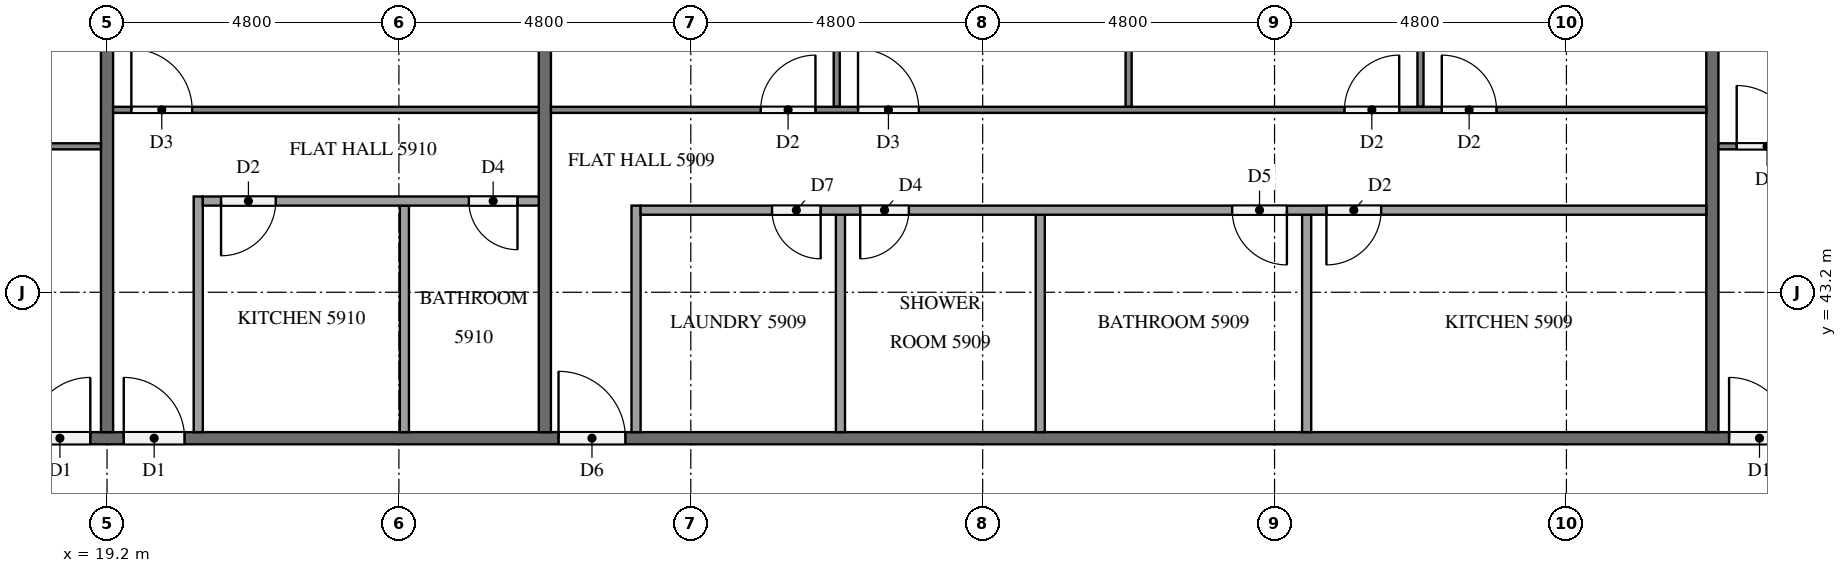
"""IFC4 building model, lengths in metres.
Left out: names, types, materials, properties, quantities, classifications, styles, units other than length and angle.
Written with IfcOpenShell. Run it as: python <this file> out.ifc"""

import sys

from ifc_helpers import new_model, si_unit, direction, frame, frame_2d, origin, place, context, subcontext, project, spatial, rectangle, extrude, element, fill, save


model = new_model("IFC4")
c1 = context("Model", 3, precision=1e-05, world=origin(), true_north=direction((0.0, 1.0)))
c2 = subcontext(c1, "Body", "Model", "MODEL_VIEW")
j1 = project(units=[si_unit("LENGTHUNIT", "METRE"), si_unit("PLANEANGLEUNIT", "RADIAN")], contexts=[c1])
p1 = place(None, origin())
s1 = spatial("IfcSite", under=j1, at=p1, CompositionType="ELEMENT")
p2 = place(p1, origin())
s2 = spatial("IfcBuilding", under=s1, at=p2, CompositionType="ELEMENT")
p3 = place(p2, frame((0.0, 0.0, 226.3)))
s3 = spatial("IfcBuildingStorey", under=s2, at=p3, CompositionType="ELEMENT", Elevation=226.3)
p4 = place(p3, frame((11.9, 40.8, 0.0), z_axis=(0.0, 0.0, 1.0), x_axis=(1.0, 0.0, 0.0)))
e1 = element("IfcWall", 1, at=p4, inside=s3, PredefinedType="PARTITIONING", context=c2, shape_type="SweptSolid", body=[
    extrude(rectangle(XDim=38.6, YDim=0.2, at=frame_2d((19.3, 0.0))), origin(), (0.0, 0.0, 1.0), 3.2),
])
p5 = place(p4, frame((33.975, 0.0, 0.0)))
e2 = element("IfcOpeningElement", 2, at=p5, cuts=e1, PredefinedType="OPENING", context=c2, shape_type="SweptSolid", body=[
    extrude(rectangle(XDim=1.0, YDim=2.1, at=frame_2d((0.5, 1.05))), frame((0.0, 0.11, 0.0), z_axis=(0.0, -1.0, 0.0), x_axis=(1.0, 0.0, 0.0)), (0.0, 0.0, 1.0), 0.22),
])
p6 = place(p4, frame((14.725, 0.0, 0.0)))
e3 = element("IfcOpeningElement", 3, at=p6, cuts=e1, PredefinedType="OPENING", context=c2, shape_type="SweptSolid", body=[
    extrude(rectangle(XDim=1.1, YDim=2.1, at=frame_2d((0.55, 1.05))), frame((0.0, 0.11, 0.0), z_axis=(0.0, -1.0, 0.0), x_axis=(1.0, 0.0, 0.0)), (0.0, 0.0, 1.0), 0.22),
])
p7 = place(p4, frame((7.575, 0.0, 0.0)))
e4 = element("IfcOpeningElement", 4, at=p7, cuts=e1, PredefinedType="OPENING", context=c2, shape_type="SweptSolid", body=[
    extrude(rectangle(XDim=1.0, YDim=2.1, at=frame_2d((0.5, 1.05))), frame((0.0, 0.11, 0.0), z_axis=(0.0, -1.0, 0.0), x_axis=(1.0, 0.0, 0.0)), (0.0, 0.0, 1.0), 0.22),
])
p8 = place(p4, frame((6.025, 0.0, 0.0)))
e5 = element("IfcOpeningElement", 5, at=p8, cuts=e1, PredefinedType="OPENING", context=c2, shape_type="SweptSolid", body=[
    extrude(rectangle(XDim=1.0, YDim=2.1, at=frame_2d((0.5, 1.05))), frame((0.0, 0.11, 0.0), z_axis=(0.0, -1.0, 0.0), x_axis=(1.0, 0.0, 0.0)), (0.0, 0.0, 1.0), 0.22),
])
for number, where, z_axis, x_axis in (
    (6, (45.6, 52.7, 0.0), (0.0, 0.0, 1.0), (0.0, -1.0, 0.0)),
    (7, (26.4, 52.7, 0.0), (0.0, 0.0, 1.0), (0.0, -1.0, 0.0)),
):
    element("IfcWall", number, at=place(p3, frame(where, z_axis=z_axis, x_axis=x_axis)), inside=s3, PredefinedType="PARTITIONING", context=c2, shape_type="SweptSolid", body=[
        extrude(rectangle(XDim=11.8, YDim=0.2, at=frame_2d((5.9, 0.0))), origin(), (0.0, 0.0, 1.0), 3.2),
    ])
p9 = place(p3, frame((19.2, 52.475, 0.0), z_axis=(0.0, 0.0, 1.0), x_axis=(0.0, -1.0, 0.0)))
e8 = element("IfcWall", 8, at=p9, inside=s3, PredefinedType="PARTITIONING", context=c2, shape_type="SweptSolid", body=[
    extrude(rectangle(XDim=11.575, YDim=0.2, at=frame_2d((5.788, 0.0))), origin(), (0.0, 0.0, 1.0), 3.2),
])
p10 = place(p3, frame((45.7, 45.6, 0.0), z_axis=(0.0, 0.0, 1.0), x_axis=(1.0, 0.0, 0.0)))
e9 = element("IfcWall", 9, at=p10, inside=s3, PredefinedType="PARTITIONING", context=c2, shape_type="SweptSolid", body=[
    extrude(rectangle(XDim=16.6, YDim=0.1, at=frame_2d((8.3, 0.0))), origin(), (0.0, 0.0, 1.0), 3.2),
])
p11 = place(p10, frame((0.3, 0.0, 0.0)))
e10 = element("IfcOpeningElement", 10, at=p11, cuts=e9, PredefinedType="OPENING", context=c2, shape_type="SweptSolid", body=[
    extrude(rectangle(XDim=1.0, YDim=2.1, at=frame_2d((0.5, 1.05))), frame((0.0, 0.06, 0.0), z_axis=(0.0, -1.0, 0.0), x_axis=(1.0, 0.0, 0.0)), (0.0, 0.0, 1.0), 0.12),
])
p12 = place(p10, frame((10.65, 0.0, 0.0)))
e11 = element("IfcOpeningElement", 11, at=p12, cuts=e9, PredefinedType="OPENING", context=c2, shape_type="SweptSolid", body=[
    extrude(rectangle(XDim=0.9, YDim=2.1, at=frame_2d((0.45, 1.05))), frame((0.0, 0.06, 0.0), z_axis=(0.0, -1.0, 0.0), x_axis=(1.0, 0.0, 0.0)), (0.0, 0.0, 1.0), 0.12),
])
p13 = place(p10, frame((12.25, 0.0, 0.0)))
e12 = element("IfcOpeningElement", 12, at=p13, cuts=e9, PredefinedType="OPENING", context=c2, shape_type="SweptSolid", body=[
    extrude(rectangle(XDim=0.9, YDim=2.1, at=frame_2d((0.45, 1.05))), frame((0.0, 0.06, 0.0), z_axis=(0.0, -1.0, 0.0), x_axis=(1.0, 0.0, 0.0)), (0.0, 0.0, 1.0), 0.12),
])
for number, where, z_axis, x_axis in (
    (13, (31.2, 46.25, 0.0), (0.0, 0.0, 1.0), (0.0, 1.0, 0.0)),
    (14, (36.0, 46.25, 0.0), (0.0, 0.0, 1.0), (0.0, 1.0, 0.0)),
    (15, (40.8, 46.25, 0.0), (0.0, 0.0, 1.0), (0.0, 1.0, 0.0)),
):
    element("IfcWall", number, at=place(p3, frame(where, z_axis=z_axis, x_axis=x_axis)), inside=s3, PredefinedType="PARTITIONING", context=c2, shape_type="SweptSolid", body=[
        extrude(rectangle(XDim=6.45, YDim=0.1, at=frame_2d((3.225, 0.0))), origin(), (0.0, 0.0, 1.0), 3.2),
    ])
p14 = place(p3, frame((26.5, 46.2, 0.0), z_axis=(0.0, 0.0, 1.0), x_axis=(1.0, 0.0, 0.0)))
e16 = element("IfcWall", 16, at=p14, inside=s3, PredefinedType="PARTITIONING", context=c2, shape_type="SweptSolid", body=[
    extrude(rectangle(XDim=19.0, YDim=0.1, at=frame_2d((9.5, 0.0))), origin(), (0.0, 0.0, 1.0), 3.2),
])
p15 = place(p14, frame((3.45, 0.0, 0.0)))
e17 = element("IfcOpeningElement", 17, at=p15, cuts=e16, PredefinedType="OPENING", context=c2, shape_type="SweptSolid", body=[
    extrude(rectangle(XDim=0.9, YDim=2.1, at=frame_2d((0.45, 1.05))), frame((0.0, 0.06, 0.0), z_axis=(0.0, -1.0, 0.0), x_axis=(1.0, 0.0, 0.0)), (0.0, 0.0, 1.0), 0.12),
])
p16 = place(p14, frame((5.05, 0.0, 0.0)))
e18 = element("IfcOpeningElement", 18, at=p16, cuts=e16, PredefinedType="OPENING", context=c2, shape_type="SweptSolid", body=[
    extrude(rectangle(XDim=1.0, YDim=2.1, at=frame_2d((0.5, 1.05))), frame((0.0, 0.06, 0.0), z_axis=(0.0, -1.0, 0.0), x_axis=(1.0, 0.0, 0.0)), (0.0, 0.0, 1.0), 0.12),
])
p17 = place(p14, frame((13.05, 0.0, 0.0)))
e19 = element("IfcOpeningElement", 19, at=p17, cuts=e16, PredefinedType="OPENING", context=c2, shape_type="SweptSolid", body=[
    extrude(rectangle(XDim=0.9, YDim=2.1, at=frame_2d((0.45, 1.05))), frame((0.0, 0.06, 0.0), z_axis=(0.0, -1.0, 0.0), x_axis=(1.0, 0.0, 0.0)), (0.0, 0.0, 1.0), 0.12),
])
p18 = place(p14, frame((14.65, 0.0, 0.0)))
e20 = element("IfcOpeningElement", 20, at=p18, cuts=e16, PredefinedType="OPENING", context=c2, shape_type="SweptSolid", body=[
    extrude(rectangle(XDim=0.9, YDim=2.1, at=frame_2d((0.45, 1.05))), frame((0.0, 0.06, 0.0), z_axis=(0.0, -1.0, 0.0), x_axis=(1.0, 0.0, 0.0)), (0.0, 0.0, 1.0), 0.12),
])
for number, where, z_axis, x_axis in (
    (21, (31.261, 40.9, 0.0), (0.0, 0.0, 1.0), (0.0, 1.0, 0.0)),
    (22, (34.547, 40.9, 0.0), (0.0, 0.0, 1.0), (0.0, 1.0, 0.0)),
    (23, (38.928, 40.9, 0.0), (0.0, 0.0, 1.0), (0.0, 1.0, 0.0)),
):
    element("IfcWall", number, at=place(p3, frame(where, z_axis=z_axis, x_axis=x_axis)), inside=s3, PredefinedType="PARTITIONING", context=c2, shape_type="SweptSolid", body=[
        extrude(rectangle(XDim=3.575, YDim=0.15, at=frame_2d((1.788, 0.0))), origin(), (0.0, 0.0, 1.0), 3.2),
    ])
p19 = place(p3, frame((27.9, 40.9, 0.0), z_axis=(0.0, 0.0, 1.0), x_axis=(0.0, 1.0, 0.0)))
e24 = element("IfcWall", 24, at=p19, inside=s3, PredefinedType="PARTITIONING", context=c2, shape_type="SweptSolid", body=[
    extrude(rectangle(XDim=3.725, YDim=0.15, at=frame_2d((1.863, 0.0))), origin(), (0.0, 0.0, 1.0), 3.2),
])
p20 = place(p3, frame((45.5, 44.55, 0.0), z_axis=(0.0, 0.0, 1.0), x_axis=(-1.0, 0.0, 0.0)))
e25 = element("IfcWall", 25, at=p20, inside=s3, PredefinedType="PARTITIONING", context=c2, shape_type="SweptSolid", body=[
    extrude(rectangle(XDim=17.525, YDim=0.15, at=frame_2d((8.762, 0.0))), origin(), (0.0, 0.0, 1.0), 3.2),
])
p21 = place(p20, frame((14.564, 0.0, 0.0)))
e26 = element("IfcOpeningElement", 26, at=p21, cuts=e25, PredefinedType="OPENING", context=c2, shape_type="SweptSolid", body=[
    extrude(rectangle(XDim=0.8, YDim=2.1, at=frame_2d((0.4, 1.05))), frame((0.0, 0.085, 0.0), z_axis=(0.0, -1.0, 0.0), x_axis=(1.0, 0.0, 0.0)), (0.0, 0.0, 1.0), 0.17),
])
p22 = place(p20, frame((13.114, 0.0, 0.0)))
e27 = element("IfcOpeningElement", 27, at=p22, cuts=e25, PredefinedType="OPENING", context=c2, shape_type="SweptSolid", body=[
    extrude(rectangle(XDim=0.8, YDim=2.1, at=frame_2d((0.4, 1.05))), frame((0.0, 0.085, 0.0), z_axis=(0.0, -1.0, 0.0), x_axis=(1.0, 0.0, 0.0)), (0.0, 0.0, 1.0), 0.17),
])
p23 = place(p20, frame((6.897, 0.0, 0.0)))
e28 = element("IfcOpeningElement", 28, at=p23, cuts=e25, PredefinedType="OPENING", context=c2, shape_type="SweptSolid", body=[
    extrude(rectangle(XDim=0.9, YDim=2.1, at=frame_2d((0.45, 1.05))), frame((0.0, 0.085, 0.0), z_axis=(0.0, -1.0, 0.0), x_axis=(1.0, 0.0, 0.0)), (0.0, 0.0, 1.0), 0.17),
])
p24 = place(p20, frame((5.347, 0.0, 0.0)))
e29 = element("IfcOpeningElement", 29, at=p24, cuts=e25, PredefinedType="OPENING", context=c2, shape_type="SweptSolid", body=[
    extrude(rectangle(XDim=0.9, YDim=2.1, at=frame_2d((0.45, 1.05))), frame((0.0, 0.085, 0.0), z_axis=(0.0, -1.0, 0.0), x_axis=(1.0, 0.0, 0.0)), (0.0, 0.0, 1.0), 0.17),
])
p25 = place(p3, frame((19.3, 46.2, 0.0), z_axis=(0.0, 0.0, 1.0), x_axis=(1.0, 0.0, 0.0)))
e30 = element("IfcWall", 30, at=p25, inside=s3, PredefinedType="PARTITIONING", context=c2, shape_type="SweptSolid", body=[
    extrude(rectangle(XDim=7.0, YDim=0.1, at=frame_2d((3.5, 0.0))), origin(), (0.0, 0.0, 1.0), 3.2),
])
p26 = place(p25, frame((0.3, 0.0, 0.0)))
e31 = element("IfcOpeningElement", 31, at=p26, cuts=e30, PredefinedType="OPENING", context=c2, shape_type="SweptSolid", body=[
    extrude(rectangle(XDim=1.0, YDim=2.1, at=frame_2d((0.5, 1.05))), frame((0.0, 0.06, 0.0), z_axis=(0.0, -1.0, 0.0), x_axis=(1.0, 0.0, 0.0)), (0.0, 0.0, 1.0), 0.12),
])
p27 = place(p3, frame((24.09, 40.9, 0.0), z_axis=(0.0, 0.0, 1.0), x_axis=(0.0, 1.0, 0.0)))
e32 = element("IfcWall", 32, at=p27, inside=s3, PredefinedType="PARTITIONING", context=c2, shape_type="SweptSolid", body=[
    extrude(rectangle(XDim=3.725, YDim=0.15, at=frame_2d((1.863, 0.0))), origin(), (0.0, 0.0, 1.0), 3.2),
])
p28 = place(p3, frame((20.7, 40.9, 0.0), z_axis=(0.0, 0.0, 1.0), x_axis=(0.0, 1.0, 0.0)))
e33 = element("IfcWall", 33, at=p28, inside=s3, PredefinedType="PARTITIONING", context=c2, shape_type="SweptSolid", body=[
    extrude(rectangle(XDim=3.875, YDim=0.15, at=frame_2d((1.938, 0.0))), origin(), (0.0, 0.0, 1.0), 3.2),
])
p29 = place(p3, frame((26.3, 44.7, 0.0), z_axis=(0.0, 0.0, 1.0), x_axis=(-1.0, 0.0, 0.0)))
e34 = element("IfcWall", 34, at=p29, inside=s3, PredefinedType="PARTITIONING", context=c2, shape_type="SweptSolid", body=[
    extrude(rectangle(XDim=5.525, YDim=0.15, at=frame_2d((2.763, 0.0))), origin(), (0.0, 0.0, 1.0), 3.2),
])
p30 = place(p29, frame((4.325, 0.0, 0.0)))
e35 = element("IfcOpeningElement", 35, at=p30, cuts=e34, PredefinedType="OPENING", context=c2, shape_type="SweptSolid", body=[
    extrude(rectangle(XDim=0.9, YDim=2.1, at=frame_2d((0.45, 1.05))), frame((0.0, 0.085, 0.0), z_axis=(0.0, -1.0, 0.0), x_axis=(1.0, 0.0, 0.0)), (0.0, 0.0, 1.0), 0.17),
])
p31 = place(p29, frame((0.35, 0.0, 0.0)))
e36 = element("IfcOpeningElement", 36, at=p31, cuts=e34, PredefinedType="OPENING", context=c2, shape_type="SweptSolid", body=[
    extrude(rectangle(XDim=0.8, YDim=2.1, at=frame_2d((0.4, 1.05))), frame((0.0, 0.085, 0.0), z_axis=(0.0, -1.0, 0.0), x_axis=(1.0, 0.0, 0.0)), (0.0, 0.0, 1.0), 0.17),
])
p32 = place(p3, frame((4.9, 45.6, 0.0), z_axis=(0.0, 0.0, 1.0), x_axis=(1.0, 0.0, 0.0)))
e37 = element("IfcWall", 37, at=p32, inside=s3, PredefinedType="PARTITIONING", context=c2, shape_type="SweptSolid", body=[
    extrude(rectangle(XDim=14.2, YDim=0.1, at=frame_2d((7.1, 0.0))), origin(), (0.0, 0.0, 1.0), 3.2),
])
p33 = place(p32, frame((9.85, 0.0, 0.0)))
e38 = element("IfcOpeningElement", 38, at=p33, cuts=e37, PredefinedType="OPENING", context=c2, shape_type="SweptSolid", body=[
    extrude(rectangle(XDim=0.9, YDim=2.1, at=frame_2d((0.45, 1.05))), frame((0.0, 0.06, 0.0), z_axis=(0.0, -1.0, 0.0), x_axis=(1.0, 0.0, 0.0)), (0.0, 0.0, 1.0), 0.12),
])
p34 = place(p32, frame((8.25, 0.0, 0.0)))
e39 = element("IfcOpeningElement", 39, at=p34, cuts=e37, PredefinedType="OPENING", context=c2, shape_type="SweptSolid", body=[
    extrude(rectangle(XDim=0.9, YDim=2.1, at=frame_2d((0.45, 1.05))), frame((0.0, 0.06, 0.0), z_axis=(0.0, -1.0, 0.0), x_axis=(1.0, 0.0, 0.0)), (0.0, 0.0, 1.0), 0.12),
])
p35 = place(p32, frame((0.3, 0.0, 0.0)))
e40 = element("IfcOpeningElement", 40, at=p35, cuts=e37, PredefinedType="OPENING", context=c2, shape_type="SweptSolid", body=[
    extrude(rectangle(XDim=1.0, YDim=2.1, at=frame_2d((0.5, 1.05))), frame((0.0, 0.06, 0.0), z_axis=(0.0, -1.0, 0.0), x_axis=(1.0, 0.0, 0.0)), (0.0, 0.0, 1.0), 0.12),
])
p36 = place(p5, origin())
e41 = element("IfcDoor", 41, at=p36, inside=s3, OperationType="SINGLE_SWING_LEFT", PredefinedType="DOOR", context=c2, shape_type="SweptSolid", body=[
    extrude(rectangle(XDim=1.0, YDim=2.1, at=frame_2d((0.5, 1.05))), frame((0.0, 0.025, 0.0), z_axis=(0.0, -1.0, 0.0), x_axis=(1.0, 0.0, 0.0)), (0.0, 0.0, 1.0), 0.05),
])
fill(e2, e41)
p37 = place(p6, origin())
e42 = element("IfcDoor", 42, at=p37, inside=s3, OperationType="SINGLE_SWING_LEFT", PredefinedType="DOOR", context=c2, shape_type="SweptSolid", body=[
    extrude(rectangle(XDim=1.1, YDim=2.1, at=frame_2d((0.55, 1.05))), frame((0.0, 0.025, 0.0), z_axis=(0.0, -1.0, 0.0), x_axis=(1.0, 0.0, 0.0)), (0.0, 0.0, 1.0), 0.05),
])
fill(e3, e42)
p38 = place(p7, origin())
e43 = element("IfcDoor", 43, at=p38, inside=s3, OperationType="SINGLE_SWING_LEFT", PredefinedType="DOOR", context=c2, shape_type="SweptSolid", body=[
    extrude(rectangle(XDim=1.0, YDim=2.1, at=frame_2d((0.5, 1.05))), frame((0.0, 0.025, 0.0), z_axis=(0.0, -1.0, 0.0), x_axis=(1.0, 0.0, 0.0)), (0.0, 0.0, 1.0), 0.05),
])
fill(e4, e43)
p39 = place(p8, origin())
e44 = element("IfcDoor", 44, at=p39, inside=s3, OperationType="SINGLE_SWING_RIGHT", PredefinedType="DOOR", context=c2, shape_type="SweptSolid", body=[
    extrude(rectangle(XDim=1.0, YDim=2.1, at=frame_2d((0.5, 1.05))), frame((0.0, 0.025, 0.0), z_axis=(0.0, -1.0, 0.0), x_axis=(1.0, 0.0, 0.0)), (0.0, 0.0, 1.0), 0.05),
])
fill(e5, e44)
p40 = place(p11, origin())
e45 = element("IfcDoor", 45, at=p40, inside=s3, OperationType="SINGLE_SWING_LEFT", PredefinedType="DOOR", context=c2, shape_type="SweptSolid", body=[
    extrude(rectangle(XDim=1.0, YDim=2.1, at=frame_2d((0.5, 1.05))), frame((0.0, 0.025, 0.0), z_axis=(0.0, -1.0, 0.0), x_axis=(1.0, 0.0, 0.0)), (0.0, 0.0, 1.0), 0.05),
])
fill(e10, e45)
p41 = place(p15, origin())
e46 = element("IfcDoor", 46, at=p41, inside=s3, OperationType="SINGLE_SWING_RIGHT", PredefinedType="DOOR", context=c2, shape_type="SweptSolid", body=[
    extrude(rectangle(XDim=0.9, YDim=2.1, at=frame_2d((0.45, 1.05))), frame((0.0, 0.025, 0.0), z_axis=(0.0, -1.0, 0.0), x_axis=(1.0, 0.0, 0.0)), (0.0, 0.0, 1.0), 0.05),
])
fill(e17, e46)
p42 = place(p16, origin())
e47 = element("IfcDoor", 47, at=p42, inside=s3, OperationType="SINGLE_SWING_LEFT", PredefinedType="DOOR", context=c2, shape_type="SweptSolid", body=[
    extrude(rectangle(XDim=1.0, YDim=2.1, at=frame_2d((0.5, 1.05))), frame((0.0, 0.025, 0.0), z_axis=(0.0, -1.0, 0.0), x_axis=(1.0, 0.0, 0.0)), (0.0, 0.0, 1.0), 0.05),
])
fill(e18, e47)
p43 = place(p17, origin())
e48 = element("IfcDoor", 48, at=p43, inside=s3, OperationType="SINGLE_SWING_RIGHT", PredefinedType="DOOR", context=c2, shape_type="SweptSolid", body=[
    extrude(rectangle(XDim=0.9, YDim=2.1, at=frame_2d((0.45, 1.05))), frame((0.0, 0.025, 0.0), z_axis=(0.0, -1.0, 0.0), x_axis=(1.0, 0.0, 0.0)), (0.0, 0.0, 1.0), 0.05),
])
fill(e19, e48)
p44 = place(p18, origin())
e49 = element("IfcDoor", 49, at=p44, inside=s3, OperationType="SINGLE_SWING_LEFT", PredefinedType="DOOR", context=c2, shape_type="SweptSolid", body=[
    extrude(rectangle(XDim=0.9, YDim=2.1, at=frame_2d((0.45, 1.05))), frame((0.0, 0.025, 0.0), z_axis=(0.0, -1.0, 0.0), x_axis=(1.0, 0.0, 0.0)), (0.0, 0.0, 1.0), 0.05),
])
fill(e20, e49)
p45 = place(p21, origin())
e50 = element("IfcDoor", 50, at=p45, inside=s3, OperationType="SINGLE_SWING_LEFT", PredefinedType="DOOR", context=c2, shape_type="SweptSolid", body=[
    extrude(rectangle(XDim=0.8, YDim=2.1, at=frame_2d((0.4, 1.05))), frame((0.0, 0.025, 0.0), z_axis=(0.0, -1.0, 0.0), x_axis=(1.0, 0.0, 0.0)), (0.0, 0.0, 1.0), 0.05),
])
fill(e26, e50)
p46 = place(p22, origin())
e51 = element("IfcDoor", 51, at=p46, inside=s3, OperationType="SINGLE_SWING_RIGHT", PredefinedType="DOOR", context=c2, shape_type="SweptSolid", body=[
    extrude(rectangle(XDim=0.8, YDim=2.1, at=frame_2d((0.4, 1.05))), frame((0.0, 0.025, 0.0), z_axis=(0.0, -1.0, 0.0), x_axis=(1.0, 0.0, 0.0)), (0.0, 0.0, 1.0), 0.05),
])
fill(e27, e51)
p47 = place(p23, origin())
e52 = element("IfcDoor", 52, at=p47, inside=s3, OperationType="SINGLE_SWING_LEFT", PredefinedType="DOOR", context=c2, shape_type="SweptSolid", body=[
    extrude(rectangle(XDim=0.9, YDim=2.1, at=frame_2d((0.45, 1.05))), frame((0.0, 0.025, 0.0), z_axis=(0.0, -1.0, 0.0), x_axis=(1.0, 0.0, 0.0)), (0.0, 0.0, 1.0), 0.05),
])
fill(e28, e52)
p48 = place(p24, origin())
e53 = element("IfcDoor", 53, at=p48, inside=s3, OperationType="SINGLE_SWING_RIGHT", PredefinedType="DOOR", context=c2, shape_type="SweptSolid", body=[
    extrude(rectangle(XDim=0.9, YDim=2.1, at=frame_2d((0.45, 1.05))), frame((0.0, 0.025, 0.0), z_axis=(0.0, -1.0, 0.0), x_axis=(1.0, 0.0, 0.0)), (0.0, 0.0, 1.0), 0.05),
])
fill(e29, e53)
p49 = place(p26, origin())
e54 = element("IfcDoor", 54, at=p49, inside=s3, OperationType="SINGLE_SWING_LEFT", PredefinedType="DOOR", context=c2, shape_type="SweptSolid", body=[
    extrude(rectangle(XDim=1.0, YDim=2.1, at=frame_2d((0.5, 1.05))), frame((0.0, 0.025, 0.0), z_axis=(0.0, -1.0, 0.0), x_axis=(1.0, 0.0, 0.0)), (0.0, 0.0, 1.0), 0.05),
])
fill(e31, e54)
p50 = place(p30, origin())
e55 = element("IfcDoor", 55, at=p50, inside=s3, OperationType="SINGLE_SWING_RIGHT", PredefinedType="DOOR", context=c2, shape_type="SweptSolid", body=[
    extrude(rectangle(XDim=0.9, YDim=2.1, at=frame_2d((0.45, 1.05))), frame((0.0, 0.025, 0.0), z_axis=(0.0, -1.0, 0.0), x_axis=(1.0, 0.0, 0.0)), (0.0, 0.0, 1.0), 0.05),
])
fill(e35, e55)
p51 = place(p31, origin())
e56 = element("IfcDoor", 56, at=p51, inside=s3, OperationType="SINGLE_SWING_LEFT", PredefinedType="DOOR", context=c2, shape_type="SweptSolid", body=[
    extrude(rectangle(XDim=0.8, YDim=2.1, at=frame_2d((0.4, 1.05))), frame((0.0, 0.025, 0.0), z_axis=(0.0, -1.0, 0.0), x_axis=(1.0, 0.0, 0.0)), (0.0, 0.0, 1.0), 0.05),
])
fill(e36, e56)
save(model, sys.argv[1])
